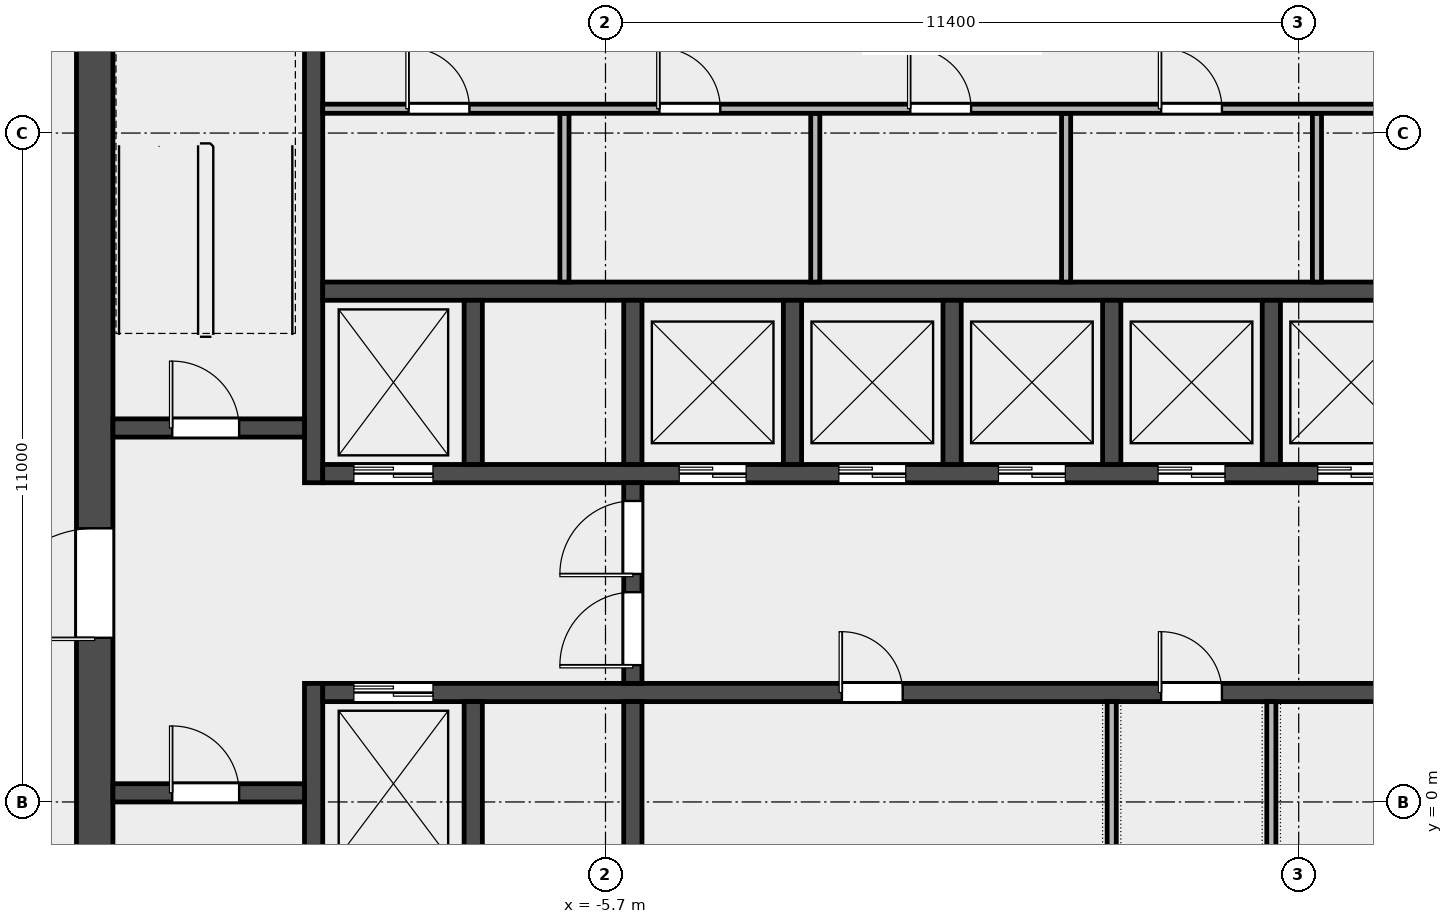
"""IFC4 building model, lengths in metres.
Left out: names, types, materials, properties, quantities, classifications, styles, units other than length and angle.
Written with IfcOpenShell. Run it as: python <this file> out.ifc"""

import sys

from ifc_helpers import new_model, si_unit, direction, frame, frame_2d, origin, place, context, subcontext, project, spatial, rectangle, extrude, element, fill, save


model = new_model("IFC4")
c1 = context("Model", 3, precision=1e-05, world=origin(), true_north=direction((0.0, 1.0)))
c2 = subcontext(c1, "Body", "Model", "MODEL_VIEW")
j1 = project(units=[si_unit("LENGTHUNIT", "METRE"), si_unit("PLANEANGLEUNIT", "RADIAN")], contexts=[c1])
p1 = place(None, origin())
s1 = spatial("IfcSite", under=j1, at=p1, CompositionType="ELEMENT")
p2 = place(p1, origin())
s2 = spatial("IfcBuilding", under=s1, at=p2, CompositionType="ELEMENT")
p3 = place(p2, frame((0.0, 0.0, 295.4)))
s3 = spatial("IfcBuildingStorey", under=s2, at=p3, CompositionType="ELEMENT", Elevation=295.4)
p4 = place(p3, frame((-14.1, -6.6, 0.0), z_axis=(0.0, 0.0, 1.0), x_axis=(0.0, 1.0, 0.0)))
e1 = element("IfcWall", 1, at=p4, inside=s3, PredefinedType="SHEAR", context=c2, shape_type="SweptSolid", body=[
    extrude(rectangle(XDim=19.5, YDim=0.6, at=frame_2d((9.75, 0.0))), origin(), (0.0, 0.0, 1.0), 3.7),
])
p5 = place(p4, frame((9.3, 0.0, 0.0)))
e2 = element("IfcOpeningElement", 2, at=p5, cuts=e1, PredefinedType="OPENING", context=c2, shape_type="SweptSolid", body=[
    extrude(rectangle(XDim=1.8, YDim=2.1, at=frame_2d((0.9, 1.05))), frame((0.0, 0.312, 0.0), z_axis=(0.0, -1.0, 0.0), x_axis=(1.0, 0.0, 0.0)), (0.0, 0.0, 1.0), 0.624),
])
p6 = place(p3, frame((-10.5, -6.6, 0.0), z_axis=(0.0, 0.0, 1.0), x_axis=(0.0, 1.0, 0.0)))
e3 = element("IfcWall", 3, at=p6, inside=s3, PredefinedType="SHEAR", context=c2, shape_type="SweptSolid", body=[
    extrude(rectangle(XDim=8.55, YDim=0.3, at=frame_2d((4.275, 0.0))), origin(), (0.0, 0.0, 1.0), 3.7),
])
p7 = place(p3, frame((-10.5, 5.25, 0.0), z_axis=(0.0, 0.0, 1.0), x_axis=(0.0, 1.0, 0.0)))
e4 = element("IfcWall", 4, at=p7, inside=s3, PredefinedType="SHEAR", context=c2, shape_type="SweptSolid", body=[
    extrude(rectangle(XDim=7.65, YDim=0.3, at=frame_2d((3.825, 0.0))), origin(), (0.0, 0.0, 1.0), 3.7),
])
p8 = place(p3, frame((-13.8, 0.15, 0.0), z_axis=(0.0, 0.0, 1.0), x_axis=(1.0, 0.0, 0.0)))
e5 = element("IfcWall", 5, at=p8, inside=s3, PredefinedType="SOLIDWALL", context=c2, shape_type="SweptSolid", body=[
    extrude(rectangle(XDim=3.15, YDim=0.3, at=frame_2d((1.575, 0.0))), origin(), (0.0, 0.0, 1.0), 3.7),
])
p9 = place(p8, frame((0.975, 0.0, 0.0)))
e6 = element("IfcOpeningElement", 6, at=p9, cuts=e5, PredefinedType="OPENING", context=c2, shape_type="SweptSolid", body=[
    extrude(rectangle(XDim=1.1, YDim=2.1, at=frame_2d((0.55, 1.05))), frame((0.0, 0.162, 0.0), z_axis=(0.0, -1.0, 0.0), x_axis=(1.0, 0.0, 0.0)), (0.0, 0.0, 1.0), 0.324),
])
p10 = place(p3, frame((-13.8, 6.15, 0.0), z_axis=(0.0, 0.0, 1.0), x_axis=(1.0, 0.0, 0.0)))
e7 = element("IfcWall", 7, at=p10, inside=s3, PredefinedType="SOLIDWALL", context=c2, shape_type="SweptSolid", body=[
    extrude(rectangle(XDim=3.15, YDim=0.3, at=frame_2d((1.575, 0.0))), origin(), (0.0, 0.0, 1.0), 3.7),
])
p11 = place(p10, frame((0.975, 0.0, 0.0)))
e8 = element("IfcOpeningElement", 8, at=p11, cuts=e7, PredefinedType="OPENING", context=c2, shape_type="SweptSolid", body=[
    extrude(rectangle(XDim=1.1, YDim=2.1, at=frame_2d((0.55, 1.05))), frame((0.0, 0.162, 0.0), z_axis=(0.0, -1.0, 0.0), x_axis=(1.0, 0.0, 0.0)), (0.0, 0.0, 1.0), 0.324),
])
p12 = place(p3, frame((-10.35, 1.8, 0.0), z_axis=(0.0, 0.0, 1.0), x_axis=(1.0, 0.0, 0.0)))
e9 = element("IfcWall", 9, at=p12, inside=s3, PredefinedType="SOLIDWALL", context=c2, shape_type="SweptSolid", body=[
    extrude(rectangle(XDim=20.7, YDim=0.3, at=frame_2d((10.35, 0.0))), origin(), (0.0, 0.0, 1.0), 3.7),
])
p13 = place(p12, frame((0.512, 0.0, 0.0)))
e10 = element("IfcOpeningElement", 10, at=p13, cuts=e9, PredefinedType="OPENING", context=c2, shape_type="SweptSolid", body=[
    extrude(rectangle(XDim=1.3, YDim=2.1, at=frame_2d((0.65, 1.05))), frame((0.0, 0.162, 0.0), z_axis=(0.0, -1.0, 0.0), x_axis=(1.0, 0.0, 0.0)), (0.0, 0.0, 1.0), 0.324),
])
p14 = place(p12, frame((8.538, 0.0, 0.0)))
e11 = element("IfcOpeningElement", 11, at=p14, cuts=e9, PredefinedType="OPENING", context=c2, shape_type="SweptSolid", body=[
    extrude(rectangle(XDim=1.0, YDim=2.1, at=frame_2d((0.5, 1.05))), frame((0.0, 0.162, 0.0), z_axis=(0.0, -1.0, 0.0), x_axis=(1.0, 0.0, 0.0)), (0.0, 0.0, 1.0), 0.324),
])
p15 = place(p12, frame((13.788, 0.0, 0.0)))
e12 = element("IfcOpeningElement", 12, at=p15, cuts=e9, PredefinedType="OPENING", context=c2, shape_type="SweptSolid", body=[
    extrude(rectangle(XDim=1.0, YDim=2.1, at=frame_2d((0.5, 1.05))), frame((0.0, 0.162, 0.0), z_axis=(0.0, -1.0, 0.0), x_axis=(1.0, 0.0, 0.0)), (0.0, 0.0, 1.0), 0.324),
])
p16 = place(p12, frame((17.725, 0.0, 0.0)))
e13 = element("IfcOpeningElement", 13, at=p16, cuts=e9, PredefinedType="OPENING", context=c2, shape_type="SweptSolid", body=[
    extrude(rectangle(XDim=1.0, YDim=2.1, at=frame_2d((0.5, 1.05))), frame((0.0, 0.162, 0.0), z_axis=(0.0, -1.0, 0.0), x_axis=(1.0, 0.0, 0.0)), (0.0, 0.0, 1.0), 0.324),
])
p17 = place(p3, frame((-10.35, 5.4, 0.0), z_axis=(0.0, 0.0, 1.0), x_axis=(1.0, 0.0, 0.0)))
e14 = element("IfcWall", 14, at=p17, inside=s3, PredefinedType="SOLIDWALL", context=c2, shape_type="SweptSolid", body=[
    extrude(rectangle(XDim=20.7, YDim=0.3, at=frame_2d((10.35, 0.0))), origin(), (0.0, 0.0, 1.0), 3.7),
])
p18 = place(p17, frame((0.512, 0.0, 0.0)))
e15 = element("IfcOpeningElement", 15, at=p18, cuts=e14, PredefinedType="OPENING", context=c2, shape_type="SweptSolid", body=[
    extrude(rectangle(XDim=1.3, YDim=2.1, at=frame_2d((0.65, 1.05))), frame((0.0, 0.162, 0.0), z_axis=(0.0, -1.0, 0.0), x_axis=(1.0, 0.0, 0.0)), (0.0, 0.0, 1.0), 0.324),
])
p19 = place(p17, frame((5.863, 0.0, 0.0)))
e16 = element("IfcOpeningElement", 16, at=p19, cuts=e14, PredefinedType="OPENING", context=c2, shape_type="SweptSolid", body=[
    extrude(rectangle(XDim=1.1, YDim=2.1, at=frame_2d((0.55, 1.05))), frame((0.0, 0.162, 0.0), z_axis=(0.0, -1.0, 0.0), x_axis=(1.0, 0.0, 0.0)), (0.0, 0.0, 1.0), 0.324),
])
p20 = place(p17, frame((8.488, 0.0, 0.0)))
e17 = element("IfcOpeningElement", 17, at=p20, cuts=e14, PredefinedType="OPENING", context=c2, shape_type="SweptSolid", body=[
    extrude(rectangle(XDim=1.1, YDim=2.1, at=frame_2d((0.55, 1.05))), frame((0.0, 0.162, 0.0), z_axis=(0.0, -1.0, 0.0), x_axis=(1.0, 0.0, 0.0)), (0.0, 0.0, 1.0), 0.324),
])
p21 = place(p17, frame((11.113, 0.0, 0.0)))
e18 = element("IfcOpeningElement", 18, at=p21, cuts=e14, PredefinedType="OPENING", context=c2, shape_type="SweptSolid", body=[
    extrude(rectangle(XDim=1.1, YDim=2.1, at=frame_2d((0.55, 1.05))), frame((0.0, 0.162, 0.0), z_axis=(0.0, -1.0, 0.0), x_axis=(1.0, 0.0, 0.0)), (0.0, 0.0, 1.0), 0.324),
])
p22 = place(p17, frame((13.738, 0.0, 0.0)))
e19 = element("IfcOpeningElement", 19, at=p22, cuts=e14, PredefinedType="OPENING", context=c2, shape_type="SweptSolid", body=[
    extrude(rectangle(XDim=1.1, YDim=2.1, at=frame_2d((0.55, 1.05))), frame((0.0, 0.162, 0.0), z_axis=(0.0, -1.0, 0.0), x_axis=(1.0, 0.0, 0.0)), (0.0, 0.0, 1.0), 0.324),
])
p23 = place(p17, frame((16.363, 0.0, 0.0)))
e20 = element("IfcOpeningElement", 20, at=p23, cuts=e14, PredefinedType="OPENING", context=c2, shape_type="SweptSolid", body=[
    extrude(rectangle(XDim=1.1, YDim=2.1, at=frame_2d((0.55, 1.05))), frame((0.0, 0.162, 0.0), z_axis=(0.0, -1.0, 0.0), x_axis=(1.0, 0.0, 0.0)), (0.0, 0.0, 1.0), 0.324),
])
p24 = place(p17, frame((18.988, 0.0, 0.0)))
e21 = element("IfcOpeningElement", 21, at=p24, cuts=e14, PredefinedType="OPENING", context=c2, shape_type="SweptSolid", body=[
    extrude(rectangle(XDim=1.1, YDim=2.1, at=frame_2d((0.55, 1.05))), frame((0.0, 0.162, 0.0), z_axis=(0.0, -1.0, 0.0), x_axis=(1.0, 0.0, 0.0)), (0.0, 0.0, 1.0), 0.324),
])
p25 = place(p3, frame((-10.35, 8.4, 0.0), z_axis=(0.0, 0.0, 1.0), x_axis=(1.0, 0.0, 0.0)))
e22 = element("IfcWall", 22, at=p25, inside=s3, PredefinedType="SOLIDWALL", context=c2, shape_type="SweptSolid", body=[
    extrude(rectangle(XDim=20.7, YDim=0.3, at=frame_2d((10.35, 0.0))), origin(), (0.0, 0.0, 1.0), 3.7),
])
for number, where, z_axis, x_axis in (
    (23, (-7.875, -1.05, 0.0), (0.0, 0.0, 1.0), (0.0, 1.0, 0.0)),
    (24, (-5.25, -1.05, 0.0), (0.0, 0.0, 1.0), (0.0, 1.0, 0.0)),
    (25, (-7.875, 5.55, 0.0), (0.0, 0.0, 1.0), (0.0, 1.0, 0.0)),
    (26, (-5.25, 5.55, 0.0), (0.0, 0.0, 1.0), (0.0, 1.0, 0.0)),
    (27, (-2.625, 5.55, 0.0), (0.0, 0.0, 1.0), (0.0, 1.0, 0.0)),
    (28, (0.0, 5.55, 0.0), (0.0, 0.0, 1.0), (0.0, 1.0, 0.0)),
    (29, (2.625, 5.55, 0.0), (0.0, 0.0, 1.0), (0.0, 1.0, 0.0)),
    (30, (5.25, 5.55, 0.0), (0.0, 0.0, 1.0), (0.0, 1.0, 0.0)),
):
    element("IfcWall", number, at=place(p3, frame(where, z_axis=z_axis, x_axis=x_axis)), inside=s3, PredefinedType="SOLIDWALL", context=c2, shape_type="SweptSolid", body=[
        extrude(rectangle(XDim=2.7, YDim=0.3, at=frame_2d((1.35, 0.0))), origin(), (0.0, 0.0, 1.0), 3.7),
    ])
p26 = place(p3, frame((-5.25, 1.95, 0.0), z_axis=(0.0, 0.0, 1.0), x_axis=(0.0, 1.0, 0.0)))
e31 = element("IfcWall", 31, at=p26, inside=s3, PredefinedType="SOLIDWALL", context=c2, shape_type="SweptSolid", body=[
    extrude(rectangle(XDim=3.3, YDim=0.3, at=frame_2d((1.65, 0.0))), origin(), (0.0, 0.0, 1.0), 3.7),
])
p27 = place(p26, frame((0.3, 0.0, 0.0)))
e32 = element("IfcOpeningElement", 32, at=p27, cuts=e31, PredefinedType="OPENING", context=c2, shape_type="SweptSolid", body=[
    extrude(rectangle(XDim=1.2, YDim=2.1, at=frame_2d((0.6, 1.05))), frame((0.0, 0.162, 0.0), z_axis=(0.0, -1.0, 0.0), x_axis=(1.0, 0.0, 0.0)), (0.0, 0.0, 1.0), 0.324),
])
p28 = place(p26, frame((1.8, 0.0, 0.0)))
e33 = element("IfcOpeningElement", 33, at=p28, cuts=e31, PredefinedType="OPENING", context=c2, shape_type="SweptSolid", body=[
    extrude(rectangle(XDim=1.2, YDim=2.1, at=frame_2d((0.6, 1.05))), frame((0.0, 0.162, 0.0), z_axis=(0.0, -1.0, 0.0), x_axis=(1.0, 0.0, 0.0)), (0.0, 0.0, 1.0), 0.324),
])
for number, where, z_axis, x_axis in (
    (34, (-6.375, 8.55, 0.0), (0.0, 0.0, 1.0), (0.0, 1.0, 0.0)),
    (35, (-2.25, 8.55, 0.0), (0.0, 0.0, 1.0), (0.0, 1.0, 0.0)),
    (36, (1.875, 8.55, 0.0), (0.0, 0.0, 1.0), (0.0, 1.0, 0.0)),
    (37, (6.0, 8.55, 0.0), (0.0, 0.0, 1.0), (0.0, 1.0, 0.0)),
):
    element("IfcWall", number, at=place(p3, frame(where, z_axis=z_axis, x_axis=x_axis)), inside=s3, PredefinedType="PARTITIONING", context=c2, shape_type="SweptSolid", body=[
        extrude(rectangle(XDim=2.775, YDim=0.15, at=frame_2d((1.387, 0.0))), origin(), (0.0, 0.0, 1.0), 3.7),
    ])
p29 = place(p3, frame((-10.35, 11.4, 0.0), z_axis=(0.0, 0.0, 1.0), x_axis=(1.0, 0.0, 0.0)))
e38 = element("IfcWall", 38, at=p29, inside=s3, PredefinedType="PARTITIONING", context=c2, shape_type="SweptSolid", body=[
    extrude(rectangle(XDim=20.7, YDim=0.15, at=frame_2d((10.35, 0.0))), origin(), (0.0, 0.0, 1.0), 3.7),
])
p30 = place(p29, frame((1.413, 0.0, 0.0)))
e39 = element("IfcOpeningElement", 39, at=p30, cuts=e38, PredefinedType="OPENING", context=c2, shape_type="SweptSolid", body=[
    extrude(rectangle(XDim=1.0, YDim=2.1, at=frame_2d((0.5, 1.05))), frame((0.0, 0.087, 0.0), z_axis=(0.0, -1.0, 0.0), x_axis=(1.0, 0.0, 0.0)), (0.0, 0.0, 1.0), 0.174),
])
p31 = place(p29, frame((5.538, 0.0, 0.0)))
e40 = element("IfcOpeningElement", 40, at=p31, cuts=e38, PredefinedType="OPENING", context=c2, shape_type="SweptSolid", body=[
    extrude(rectangle(XDim=1.0, YDim=2.1, at=frame_2d((0.5, 1.05))), frame((0.0, 0.087, 0.0), z_axis=(0.0, -1.0, 0.0), x_axis=(1.0, 0.0, 0.0)), (0.0, 0.0, 1.0), 0.174),
])
p32 = place(p29, frame((9.663, 0.0, 0.0)))
e41 = element("IfcOpeningElement", 41, at=p32, cuts=e38, PredefinedType="OPENING", context=c2, shape_type="SweptSolid", body=[
    extrude(rectangle(XDim=1.0, YDim=2.1, at=frame_2d((0.5, 1.05))), frame((0.0, 0.087, 0.0), z_axis=(0.0, -1.0, 0.0), x_axis=(1.0, 0.0, 0.0)), (0.0, 0.0, 1.0), 0.174),
])
p33 = place(p29, frame((13.788, 0.0, 0.0)))
e42 = element("IfcOpeningElement", 42, at=p33, cuts=e38, PredefinedType="OPENING", context=c2, shape_type="SweptSolid", body=[
    extrude(rectangle(XDim=1.0, YDim=2.1, at=frame_2d((0.5, 1.05))), frame((0.0, 0.087, 0.0), z_axis=(0.0, -1.0, 0.0), x_axis=(1.0, 0.0, 0.0)), (0.0, 0.0, 1.0), 0.174),
])
p34 = place(p29, frame((18.1, 0.0, 0.0)))
e43 = element("IfcOpeningElement", 43, at=p34, cuts=e38, PredefinedType="OPENING", context=c2, shape_type="SweptSolid", body=[
    extrude(rectangle(XDim=1.0, YDim=2.1, at=frame_2d((0.5, 1.05))), frame((0.0, 0.087, 0.0), z_axis=(0.0, -1.0, 0.0), x_axis=(1.0, 0.0, 0.0)), (0.0, 0.0, 1.0), 0.174),
])
for number, where, z_axis, x_axis in (
    (44, (2.625, -1.05, 0.0), (0.0, 0.0, 1.0), (0.0, 1.0, 0.0)),
    (45, (5.25, -1.05, 0.0), (0.0, 0.0, 1.0), (0.0, 1.0, 0.0)),
):
    element("IfcWall", number, at=place(p3, frame(where, z_axis=z_axis, x_axis=x_axis)), inside=s3, PredefinedType="PARTITIONING", context=c2, shape_type="SweptSolid", body=[
        extrude(rectangle(XDim=2.7, YDim=0.15, at=frame_2d((1.35, 0.0))), origin(), (0.0, 0.0, 1.0), 3.7),
    ])
p35 = place(p9, origin())
e46 = element("IfcDoor", 46, at=p35, inside=s3, OperationType="SINGLE_SWING_LEFT", PredefinedType="DOOR", context=c2, shape_type="SweptSolid", body=[
    extrude(rectangle(XDim=1.1, YDim=2.1, at=frame_2d((0.55, 1.05))), frame((0.0, 0.025, 0.0), z_axis=(0.0, -1.0, 0.0), x_axis=(1.0, 0.0, 0.0)), (0.0, 0.0, 1.0), 0.05),
])
fill(e6, e46)
p36 = place(p11, origin())
e47 = element("IfcDoor", 47, at=p36, inside=s3, OperationType="SINGLE_SWING_LEFT", PredefinedType="DOOR", context=c2, shape_type="SweptSolid", body=[
    extrude(rectangle(XDim=1.1, YDim=2.1, at=frame_2d((0.55, 1.05))), frame((0.0, 0.025, 0.0), z_axis=(0.0, -1.0, 0.0), x_axis=(1.0, 0.0, 0.0)), (0.0, 0.0, 1.0), 0.05),
])
fill(e8, e47)
p37 = place(p5, origin())
e48 = element("IfcDoor", 48, at=p37, inside=s3, OperationType="DOUBLE_DOOR_SINGLE_SWING", PredefinedType="DOOR", context=c2, shape_type="SweptSolid", body=[
    extrude(rectangle(XDim=1.8, YDim=2.1, at=frame_2d((0.9, 1.05))), frame((0.0, 0.025, 0.0), z_axis=(0.0, -1.0, 0.0), x_axis=(1.0, 0.0, 0.0)), (0.0, 0.0, 1.0), 0.05),
])
fill(e2, e48)
p38 = place(p27, origin())
e49 = element("IfcDoor", 49, at=p38, inside=s3, OperationType="SINGLE_SWING_LEFT", PredefinedType="DOOR", context=c2, shape_type="SweptSolid", body=[
    extrude(rectangle(XDim=1.2, YDim=2.1, at=frame_2d((0.6, 1.05))), frame((0.0, 0.025, 0.0), z_axis=(0.0, -1.0, 0.0), x_axis=(1.0, 0.0, 0.0)), (0.0, 0.0, 1.0), 0.05),
])
fill(e32, e49)
p39 = place(p28, origin())
e50 = element("IfcDoor", 50, at=p39, inside=s3, OperationType="SINGLE_SWING_RIGHT", PredefinedType="DOOR", context=c2, shape_type="SweptSolid", body=[
    extrude(rectangle(XDim=1.2, YDim=2.1, at=frame_2d((0.6, 1.05))), frame((0.0, 0.025, 0.0), z_axis=(0.0, -1.0, 0.0), x_axis=(1.0, 0.0, 0.0)), (0.0, 0.0, 1.0), 0.05),
])
fill(e33, e50)
p40 = place(p13, origin())
e51 = element("IfcDoor", 51, at=p40, inside=s3, OperationType="DOUBLE_DOOR_SLIDING", PredefinedType="DOOR", context=c2, shape_type="SweptSolid", body=[
    extrude(rectangle(XDim=1.3, YDim=2.1, at=frame_2d((0.65, 1.05))), frame((0.0, 0.025, 0.0), z_axis=(0.0, -1.0, 0.0), x_axis=(1.0, 0.0, 0.0)), (0.0, 0.0, 1.0), 0.05),
])
fill(e10, e51)
p41 = place(p18, origin())
e52 = element("IfcDoor", 52, at=p41, inside=s3, OperationType="DOUBLE_DOOR_SLIDING", PredefinedType="DOOR", context=c2, shape_type="SweptSolid", body=[
    extrude(rectangle(XDim=1.3, YDim=2.1, at=frame_2d((0.65, 1.05))), frame((0.0, 0.025, 0.0), z_axis=(0.0, -1.0, 0.0), x_axis=(1.0, 0.0, 0.0)), (0.0, 0.0, 1.0), 0.05),
])
fill(e15, e52)
p42 = place(p19, origin())
e53 = element("IfcDoor", 53, at=p42, inside=s3, OperationType="DOUBLE_DOOR_SLIDING", PredefinedType="DOOR", context=c2, shape_type="SweptSolid", body=[
    extrude(rectangle(XDim=1.1, YDim=2.1, at=frame_2d((0.55, 1.05))), frame((0.0, 0.025, 0.0), z_axis=(0.0, -1.0, 0.0), x_axis=(1.0, 0.0, 0.0)), (0.0, 0.0, 1.0), 0.05),
])
fill(e16, e53)
p43 = place(p20, origin())
e54 = element("IfcDoor", 54, at=p43, inside=s3, OperationType="DOUBLE_DOOR_SLIDING", PredefinedType="DOOR", context=c2, shape_type="SweptSolid", body=[
    extrude(rectangle(XDim=1.1, YDim=2.1, at=frame_2d((0.55, 1.05))), frame((0.0, 0.025, 0.0), z_axis=(0.0, -1.0, 0.0), x_axis=(1.0, 0.0, 0.0)), (0.0, 0.0, 1.0), 0.05),
])
fill(e17, e54)
p44 = place(p21, origin())
e55 = element("IfcDoor", 55, at=p44, inside=s3, OperationType="DOUBLE_DOOR_SLIDING", PredefinedType="DOOR", context=c2, shape_type="SweptSolid", body=[
    extrude(rectangle(XDim=1.1, YDim=2.1, at=frame_2d((0.55, 1.05))), frame((0.0, 0.025, 0.0), z_axis=(0.0, -1.0, 0.0), x_axis=(1.0, 0.0, 0.0)), (0.0, 0.0, 1.0), 0.05),
])
fill(e18, e55)
p45 = place(p22, origin())
e56 = element("IfcDoor", 56, at=p45, inside=s3, OperationType="DOUBLE_DOOR_SLIDING", PredefinedType="DOOR", context=c2, shape_type="SweptSolid", body=[
    extrude(rectangle(XDim=1.1, YDim=2.1, at=frame_2d((0.55, 1.05))), frame((0.0, 0.025, 0.0), z_axis=(0.0, -1.0, 0.0), x_axis=(1.0, 0.0, 0.0)), (0.0, 0.0, 1.0), 0.05),
])
fill(e19, e56)
p46 = place(p23, origin())
e57 = element("IfcDoor", 57, at=p46, inside=s3, OperationType="DOUBLE_DOOR_SLIDING", PredefinedType="DOOR", context=c2, shape_type="SweptSolid", body=[
    extrude(rectangle(XDim=1.1, YDim=2.1, at=frame_2d((0.55, 1.05))), frame((0.0, 0.025, 0.0), z_axis=(0.0, -1.0, 0.0), x_axis=(1.0, 0.0, 0.0)), (0.0, 0.0, 1.0), 0.05),
])
fill(e20, e57)
p47 = place(p30, origin())
e58 = element("IfcDoor", 58, at=p47, inside=s3, OperationType="SINGLE_SWING_LEFT", PredefinedType="DOOR", context=c2, shape_type="SweptSolid", body=[
    extrude(rectangle(XDim=1.0, YDim=2.1, at=frame_2d((0.5, 1.05))), frame((0.0, 0.025, 0.0), z_axis=(0.0, -1.0, 0.0), x_axis=(1.0, 0.0, 0.0)), (0.0, 0.0, 1.0), 0.05),
])
fill(e39, e58)
p48 = place(p31, origin())
e59 = element("IfcDoor", 59, at=p48, inside=s3, OperationType="SINGLE_SWING_LEFT", PredefinedType="DOOR", context=c2, shape_type="SweptSolid", body=[
    extrude(rectangle(XDim=1.0, YDim=2.1, at=frame_2d((0.5, 1.05))), frame((0.0, 0.025, 0.0), z_axis=(0.0, -1.0, 0.0), x_axis=(1.0, 0.0, 0.0)), (0.0, 0.0, 1.0), 0.05),
])
fill(e40, e59)
p49 = place(p32, origin())
e60 = element("IfcDoor", 60, at=p49, inside=s3, OperationType="SINGLE_SWING_LEFT", PredefinedType="DOOR", context=c2, shape_type="SweptSolid", body=[
    extrude(rectangle(XDim=1.0, YDim=2.1, at=frame_2d((0.5, 1.05))), frame((0.0, 0.025, 0.0), z_axis=(0.0, -1.0, 0.0), x_axis=(1.0, 0.0, 0.0)), (0.0, 0.0, 1.0), 0.05),
])
fill(e41, e60)
p50 = place(p33, origin())
e61 = element("IfcDoor", 61, at=p50, inside=s3, OperationType="SINGLE_SWING_LEFT", PredefinedType="DOOR", context=c2, shape_type="SweptSolid", body=[
    extrude(rectangle(XDim=1.0, YDim=2.1, at=frame_2d((0.5, 1.05))), frame((0.0, 0.025, 0.0), z_axis=(0.0, -1.0, 0.0), x_axis=(1.0, 0.0, 0.0)), (0.0, 0.0, 1.0), 0.05),
])
fill(e42, e61)
p51 = place(p14, origin())
e62 = element("IfcDoor", 62, at=p51, inside=s3, OperationType="SINGLE_SWING_LEFT", PredefinedType="DOOR", context=c2, shape_type="SweptSolid", body=[
    extrude(rectangle(XDim=1.0, YDim=2.1, at=frame_2d((0.5, 1.05))), frame((0.0, 0.025, 0.0), z_axis=(0.0, -1.0, 0.0), x_axis=(1.0, 0.0, 0.0)), (0.0, 0.0, 1.0), 0.05),
])
fill(e11, e62)
p52 = place(p15, origin())
e63 = element("IfcDoor", 63, at=p52, inside=s3, OperationType="SINGLE_SWING_LEFT", PredefinedType="DOOR", context=c2, shape_type="SweptSolid", body=[
    extrude(rectangle(XDim=1.0, YDim=2.1, at=frame_2d((0.5, 1.05))), frame((0.0, 0.025, 0.0), z_axis=(0.0, -1.0, 0.0), x_axis=(1.0, 0.0, 0.0)), (0.0, 0.0, 1.0), 0.05),
])
fill(e12, e63)
save(model, sys.argv[1])
